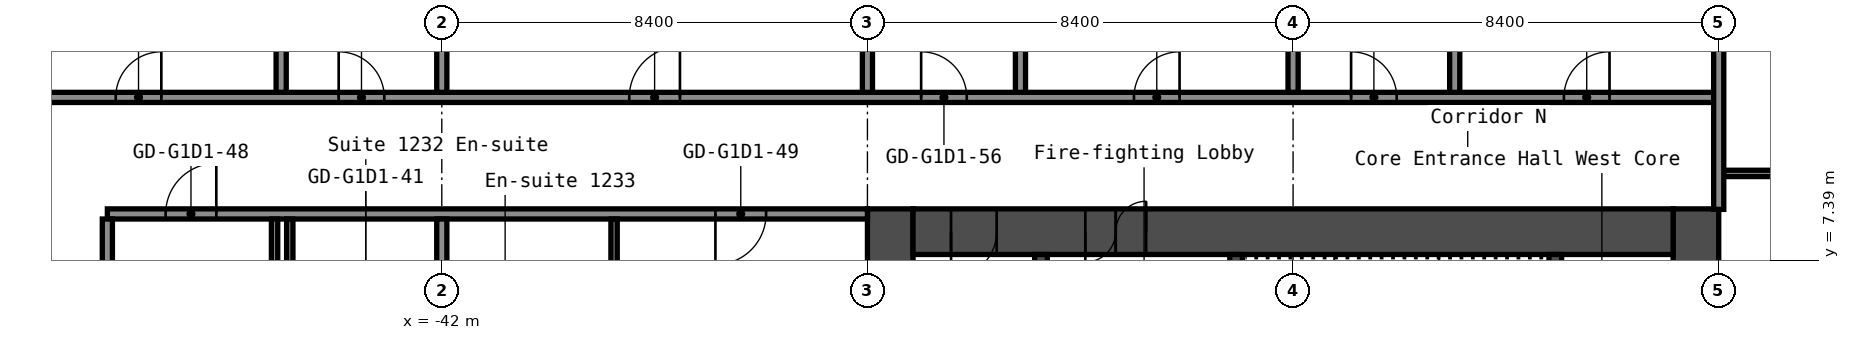
"""IFC4 building model, lengths in metres.
Left out: names, types, materials, properties, quantities, classifications, styles, units other than length and angle.
Written with IfcOpenShell. Run it as: python <this file> out.ifc"""

import sys

from ifc_helpers import new_model, si_unit, direction, frame, frame_2d, origin, place, context, subcontext, project, spatial, rectangle, extrude, element, fill, save


model = new_model("IFC4")
c1 = context("Model", 3, precision=1e-05, world=origin(), true_north=direction((0.0, 1.0)))
c2 = subcontext(c1, "Body", "Model", "MODEL_VIEW")
j1 = project(units=[si_unit("LENGTHUNIT", "METRE"), si_unit("PLANEANGLEUNIT", "RADIAN")], contexts=[c1])
p1 = place(None, origin())
s1 = spatial("IfcSite", under=j1, at=p1, CompositionType="ELEMENT")
p2 = place(p1, origin())
s2 = spatial("IfcBuilding", under=s1, at=p2, CompositionType="ELEMENT")
p3 = place(p2, frame((0.0, 0.0, 45.4)))
s3 = spatial("IfcBuildingStorey", under=s2, at=p3, CompositionType="ELEMENT", Elevation=45.4)
p4 = place(p3, frame((-17.25, -8.4, 0.0), z_axis=(0.0, 0.0, 1.0), x_axis=(0.0, 1.0, 0.0)))
e1 = element("IfcWall", 1, at=p4, inside=s3, PredefinedType="SHEAR", context=c2, shape_type="SweptSolid", body=[
    extrude(rectangle(XDim=16.8, YDim=0.9, at=frame_2d((8.4, 0.0))), origin(), (0.0, 0.0, 1.0), 2.8),
])
p5 = place(p4, frame((12.75, 0.0, 0.0)))
e2 = element("IfcOpeningElement", 2, at=p5, cuts=e1, PredefinedType="OPENING", context=c2, shape_type="SweptSolid", body=[
    extrude(rectangle(XDim=1.2, YDim=2.1, at=frame_2d((0.6, 1.05))), frame((0.0, 0.46, 0.0), z_axis=(0.0, -1.0, 0.0), x_axis=(1.0, 0.0, 0.0)), (0.0, 0.0, 1.0), 0.92),
])
p6 = place(p4, frame((2.85, 0.0, 0.0)))
e3 = element("IfcOpeningElement", 3, at=p6, cuts=e1, PredefinedType="OPENING", context=c2, shape_type="SweptSolid", body=[
    extrude(rectangle(XDim=1.2, YDim=2.1, at=frame_2d((0.6, 1.05))), frame((0.0, 0.46, 0.0), z_axis=(0.0, -1.0, 0.0), x_axis=(1.0, 0.0, 0.0)), (0.0, 0.0, 1.0), 0.92),
])
p7 = place(p3, frame((-33.15, -8.4, 0.0), z_axis=(0.0, 0.0, 1.0), x_axis=(0.0, 1.0, 0.0)))
e4 = element("IfcWall", 4, at=p7, inside=s3, PredefinedType="SHEAR", context=c2, shape_type="SweptSolid", body=[
    extrude(rectangle(XDim=16.8, YDim=0.9, at=frame_2d((8.4, 0.0))), origin(), (0.0, 0.0, 1.0), 2.8),
])
p8 = place(p3, frame((-32.7, 7.95, 0.0), z_axis=(0.0, 0.0, 1.0), x_axis=(1.0, 0.0, 0.0)))
e5 = element("IfcWall", 5, at=p8, inside=s3, PredefinedType="SHEAR", context=c2, shape_type="SweptSolid", body=[
    extrude(rectangle(XDim=15.0, YDim=0.9, at=frame_2d((7.5, 0.0))), origin(), (0.0, 0.0, 1.0), 2.8),
])
p9 = place(p8, frame((3.4, 0.0, 0.0)))
e6 = element("IfcOpeningElement", 6, at=p9, cuts=e5, PredefinedType="OPENING", context=c2, shape_type="SweptSolid", body=[
    extrude(rectangle(XDim=1.2, YDim=2.1, at=frame_2d((0.6, 1.05))), frame((0.0, 0.46, 0.0), z_axis=(0.0, -1.0, 0.0), x_axis=(1.0, 0.0, 0.0)), (0.0, 0.0, 1.0), 0.92),
])
p10 = place(p8, frame((0.75, 0.0, 0.0)))
e7 = element("IfcOpeningElement", 7, at=p10, cuts=e5, PredefinedType="OPENING", context=c2, shape_type="SweptSolid", body=[
    extrude(rectangle(XDim=0.9, YDim=2.1, at=frame_2d((0.45, 1.05))), frame((0.0, 0.46, 0.0), z_axis=(0.0, -1.0, 0.0), x_axis=(1.0, 0.0, 0.0)), (0.0, 0.0, 1.0), 0.92),
])
p11 = place(p3, frame((-20.025, 1.2, 0.0), z_axis=(0.0, 0.0, 1.0), x_axis=(0.0, 1.0, 0.0)))
e8 = element("IfcWall", 8, at=p11, inside=s3, PredefinedType="SHEAR", context=c2, shape_type="SweptSolid", body=[
    extrude(rectangle(XDim=6.3, YDim=0.25, at=frame_2d((3.15, 0.0))), origin(), (0.0, 0.0, 1.0), 2.8),
])
p12 = place(p3, frame((-26.325, 3.75, 0.0), z_axis=(0.0, 0.0, 1.0), x_axis=(0.0, 1.0, 0.0)))
e9 = element("IfcWall", 9, at=p12, inside=s3, PredefinedType="SHEAR", context=c2, shape_type="SweptSolid", body=[
    extrude(rectangle(XDim=3.75, YDim=0.25, at=frame_2d((1.875, 0.0))), origin(), (0.0, 0.0, 1.0), 2.8),
])
p13 = place(p12, frame((1.25, 0.0, 0.0)))
e10 = element("IfcOpeningElement", 10, at=p13, cuts=e9, PredefinedType="OPENING", context=c2, shape_type="SweptSolid", body=[
    extrude(rectangle(XDim=1.2, YDim=2.1, at=frame_2d((0.6, 1.05))), frame((0.0, 0.135, 0.0), z_axis=(0.0, -1.0, 0.0), x_axis=(1.0, 0.0, 0.0)), (0.0, 0.0, 1.0), 0.27),
])
p14 = place(p3, frame((-30.175, 1.45, 0.0), z_axis=(0.0, 0.0, 1.0), x_axis=(0.0, 1.0, 0.0)))
e11 = element("IfcWall", 11, at=p14, inside=s3, PredefinedType="SHEAR", context=c2, shape_type="SweptSolid", body=[
    extrude(rectangle(XDim=6.05, YDim=0.25, at=frame_2d((3.025, 0.0))), origin(), (0.0, 0.0, 1.0), 2.8),
])
p15 = place(p14, frame((2.625, 0.0, 0.0)))
e12 = element("IfcOpeningElement", 12, at=p15, cuts=e11, PredefinedType="OPENING", context=c2, shape_type="SweptSolid", body=[
    extrude(rectangle(XDim=1.1, YDim=2.1, at=frame_2d((0.55, 1.05))), frame((0.0, 0.135, 0.0), z_axis=(0.0, -1.0, 0.0), x_axis=(1.0, 0.0, 0.0)), (0.0, 0.0, 1.0), 0.27),
])
p16 = place(p3, frame((-48.6, 8.3, 0.0), z_axis=(0.0, 0.0, 1.0), x_axis=(1.0, 0.0, 0.0)))
e13 = element("IfcWall", 13, at=p16, inside=s3, PredefinedType="PARTITIONING", context=c2, shape_type="SweptSolid", body=[
    extrude(rectangle(XDim=15.0, YDim=0.2, at=frame_2d((7.5, 0.0))), origin(), (0.0, 0.0, 1.0), 2.8),
])
p17 = place(p16, frame((1.15, 0.0, 0.0)))
e14 = element("IfcOpeningElement", 14, at=p17, cuts=e13, PredefinedType="OPENING", context=c2, shape_type="SweptSolid", body=[
    extrude(rectangle(XDim=1.0, YDim=2.1, at=frame_2d((0.5, 1.05))), frame((0.0, 0.11, 0.0), z_axis=(0.0, -1.0, 0.0), x_axis=(1.0, 0.0, 0.0)), (0.0, 0.0, 1.0), 0.22),
])
p18 = place(p16, frame((12.0, 0.0, 0.0)))
e15 = element("IfcOpeningElement", 15, at=p18, cuts=e13, PredefinedType="OPENING", context=c2, shape_type="SweptSolid", body=[
    extrude(rectangle(XDim=1.0, YDim=2.1, at=frame_2d((0.5, 1.05))), frame((0.0, 0.11, 0.0), z_axis=(0.0, -1.0, 0.0), x_axis=(1.0, 0.0, 0.0)), (0.0, 0.0, 1.0), 0.22),
])
p19 = place(p3, frame((-16.7, 9.1, 0.0), z_axis=(0.0, 0.0, 1.0), x_axis=(1.0, 0.0, 0.0)))
e16 = element("IfcWall", 16, at=p19, inside=s3, PredefinedType="PARTITIONING", context=c2, shape_type="SweptSolid", body=[
    extrude(rectangle(XDim=2.337, YDim=0.125, at=frame_2d((1.169, 0.0))), origin(), (0.0, 0.0, 1.0), 2.8),
])
p20 = place(p3, frame((-51.1, 10.6, 0.0), z_axis=(0.0, 0.0, 1.0), x_axis=(1.0, 0.0, 0.0)))
e17 = element("IfcWall", 17, at=p20, inside=s3, PredefinedType="PARTITIONING", context=c2, shape_type="SweptSolid", body=[
    extrude(rectangle(XDim=34.3, YDim=0.2, at=frame_2d((17.15, 0.0))), origin(), (0.0, 0.0, 1.0), 2.8),
])
p21 = place(p20, frame((2.665, 0.0, 0.0)))
e18 = element("IfcOpeningElement", 18, at=p21, cuts=e17, PredefinedType="OPENING", context=c2, shape_type="SweptSolid", body=[
    extrude(rectangle(XDim=0.9, YDim=2.1, at=frame_2d((0.45, 1.05))), frame((0.0, 0.11, 0.0), z_axis=(0.0, -1.0, 0.0), x_axis=(1.0, 0.0, 0.0)), (0.0, 0.0, 1.0), 0.22),
])
p22 = place(p20, frame((7.065, 0.0, 0.0)))
e19 = element("IfcOpeningElement", 19, at=p22, cuts=e17, PredefinedType="OPENING", context=c2, shape_type="SweptSolid", body=[
    extrude(rectangle(XDim=0.9, YDim=2.1, at=frame_2d((0.45, 1.05))), frame((0.0, 0.11, 0.0), z_axis=(0.0, -1.0, 0.0), x_axis=(1.0, 0.0, 0.0)), (0.0, 0.0, 1.0), 0.22),
])
p23 = place(p20, frame((12.8, 0.0, 0.0)))
e20 = element("IfcOpeningElement", 20, at=p23, cuts=e17, PredefinedType="OPENING", context=c2, shape_type="SweptSolid", body=[
    extrude(rectangle(XDim=1.0, YDim=2.1, at=frame_2d((0.5, 1.05))), frame((0.0, 0.11, 0.0), z_axis=(0.0, -1.0, 0.0), x_axis=(1.0, 0.0, 0.0)), (0.0, 0.0, 1.0), 0.22),
])
p24 = place(p20, frame((18.56, 0.0, 0.0)))
e21 = element("IfcOpeningElement", 21, at=p24, cuts=e17, PredefinedType="OPENING", context=c2, shape_type="SweptSolid", body=[
    extrude(rectangle(XDim=0.9, YDim=2.1, at=frame_2d((0.45, 1.05))), frame((0.0, 0.11, 0.0), z_axis=(0.0, -1.0, 0.0), x_axis=(1.0, 0.0, 0.0)), (0.0, 0.0, 1.0), 0.22),
])
p25 = place(p20, frame((22.76, 0.0, 0.0)))
e22 = element("IfcOpeningElement", 22, at=p25, cuts=e17, PredefinedType="OPENING", context=c2, shape_type="SweptSolid", body=[
    extrude(rectangle(XDim=0.9, YDim=2.1, at=frame_2d((0.45, 1.05))), frame((0.0, 0.11, 0.0), z_axis=(0.0, -1.0, 0.0), x_axis=(1.0, 0.0, 0.0)), (0.0, 0.0, 1.0), 0.22),
])
p26 = place(p20, frame((27.045, 0.0, 0.0)))
e23 = element("IfcOpeningElement", 23, at=p26, cuts=e17, PredefinedType="OPENING", context=c2, shape_type="SweptSolid", body=[
    extrude(rectangle(XDim=0.9, YDim=2.1, at=frame_2d((0.45, 1.05))), frame((0.0, 0.11, 0.0), z_axis=(0.0, -1.0, 0.0), x_axis=(1.0, 0.0, 0.0)), (0.0, 0.0, 1.0), 0.22),
])
p27 = place(p20, frame((31.245, 0.0, 0.0)))
e24 = element("IfcOpeningElement", 24, at=p27, cuts=e17, PredefinedType="OPENING", context=c2, shape_type="SweptSolid", body=[
    extrude(rectangle(XDim=0.9, YDim=2.1, at=frame_2d((0.45, 1.05))), frame((0.0, 0.11, 0.0), z_axis=(0.0, -1.0, 0.0), x_axis=(1.0, 0.0, 0.0)), (0.0, 0.0, 1.0), 0.22),
])
p28 = place(p3, frame((-48.6, -8.2, 0.0), z_axis=(0.0, 0.0, 1.0), x_axis=(0.0, 1.0, 0.0)))
e25 = element("IfcWall", 25, at=p28, inside=s3, PredefinedType="PARTITIONING", context=c2, shape_type="SweptSolid", body=[
    extrude(rectangle(XDim=16.4, YDim=0.2, at=frame_2d((8.2, 0.0))), origin(), (0.0, 0.0, 1.0), 2.8),
])
p29 = place(p3, frame((-45.3, 0.1, 0.0), z_axis=(0.0, 0.0, 1.0), x_axis=(0.0, 1.0, 0.0)))
e26 = element("IfcWall", 26, at=p29, inside=s3, PredefinedType="PARTITIONING", context=c2, shape_type="SweptSolid", body=[
    extrude(rectangle(XDim=8.1, YDim=0.125, at=frame_2d((4.05, 0.0))), origin(), (0.0, 0.0, 1.0), 2.8),
])
p30 = place(p29, frame((3.15, 0.0, 0.0)))
e27 = element("IfcOpeningElement", 27, at=p30, cuts=e26, PredefinedType="OPENING", context=c2, shape_type="SweptSolid", body=[
    extrude(rectangle(XDim=0.9, YDim=2.1, at=frame_2d((0.45, 1.05))), frame((0.0, 0.073, 0.0), z_axis=(0.0, -1.0, 0.0), x_axis=(1.0, 0.0, 0.0)), (0.0, 0.0, 1.0), 0.145),
])
p31 = place(p3, frame((-45.17, 10.7, 0.0), z_axis=(0.0, 0.0, 1.0), x_axis=(0.0, 1.0, 0.0)))
e28 = element("IfcWall", 28, at=p31, inside=s3, PredefinedType="PARTITIONING", context=c2, shape_type="SweptSolid", body=[
    extrude(rectangle(XDim=9.6, YDim=0.2, at=frame_2d((4.8, 0.0))), origin(), (0.0, 0.0, 1.0), 2.8),
])
p32 = place(p3, frame((-45.0, 5.1, 0.0), z_axis=(0.0, 0.0, 1.0), x_axis=(0.0, 1.0, 0.0)))
e29 = element("IfcWall", 29, at=p32, inside=s3, PredefinedType="PARTITIONING", context=c2, shape_type="SweptSolid", body=[
    extrude(rectangle(XDim=3.1, YDim=0.125, at=frame_2d((1.55, 0.0))), origin(), (0.0, 0.0, 1.0), 2.8),
])
p33 = place(p3, frame((-42.0, 0.0, 0.0), z_axis=(0.0, 0.0, 1.0), x_axis=(0.0, 1.0, 0.0)))
e30 = element("IfcWall", 30, at=p33, inside=s3, PredefinedType="PARTITIONING", context=c2, shape_type="SweptSolid", body=[
    extrude(rectangle(XDim=8.2, YDim=0.2, at=frame_2d((4.1, 0.0))), origin(), (0.0, 0.0, 1.0), 2.8),
])
p34 = place(p3, frame((-42.0, 10.7, 0.0), z_axis=(0.0, 0.0, 1.0), x_axis=(0.0, 1.0, 0.0)))
e31 = element("IfcWall", 31, at=p34, inside=s3, PredefinedType="PARTITIONING", context=c2, shape_type="SweptSolid", body=[
    extrude(rectangle(XDim=9.6, YDim=0.2, at=frame_2d((4.8, 0.0))), origin(), (0.0, 0.0, 1.0), 2.8),
])
p35 = place(p3, frame((-38.6, 4.9, 0.0), z_axis=(0.0, 0.0, 1.0), x_axis=(0.0, 1.0, 0.0)))
e32 = element("IfcWall", 32, at=p35, inside=s3, PredefinedType="PARTITIONING", context=c2, shape_type="SweptSolid", body=[
    extrude(rectangle(XDim=3.3, YDim=0.125, at=frame_2d((1.65, 0.0))), origin(), (0.0, 0.0, 1.0), 2.8),
])
for number, where, z_axis, x_axis in (
    (33, (-33.6, 10.7, 0.0), (0.0, 0.0, 1.0), (0.0, 1.0, 0.0)),
    (34, (-30.58, 10.7, 0.0), (0.0, 0.0, 1.0), (0.0, 1.0, 0.0)),
    (35, (-25.2, 10.7, 0.0), (0.0, 0.0, 1.0), (0.0, 1.0, 0.0)),
    (36, (-22.01, 10.7, 0.0), (0.0, 0.0, 1.0), (0.0, 1.0, 0.0)),
):
    element("IfcWall", number, at=place(p3, frame(where, z_axis=z_axis, x_axis=x_axis)), inside=s3, PredefinedType="PARTITIONING", context=c2, shape_type="SweptSolid", body=[
        extrude(rectangle(XDim=9.6, YDim=0.2, at=frame_2d((4.8, 0.0))), origin(), (0.0, 0.0, 1.0), 2.8),
    ])
p36 = place(p3, frame((-16.8, 8.39, 0.0), z_axis=(0.0, 0.0, 1.0), x_axis=(0.0, 1.0, 0.0)))
e37 = element("IfcWall", 37, at=p36, inside=s3, PredefinedType="PARTITIONING", context=c2, shape_type="SweptSolid", body=[
    extrude(rectangle(XDim=11.91, YDim=0.2, at=frame_2d((5.955, 0.0))), origin(), (0.0, 0.0, 1.0), 2.8),
])
p37 = place(p9, origin())
e38 = element("IfcDoor", 38, at=p37, inside=s3, OperationType="DOUBLE_DOOR_SINGLE_SWING", PredefinedType="DOOR", context=c2, shape_type="SweptSolid", body=[
    extrude(rectangle(XDim=1.2, YDim=2.1, at=frame_2d((0.6, 1.05))), frame((0.0, 0.025, 0.0), z_axis=(0.0, -1.0, 0.0), x_axis=(1.0, 0.0, 0.0)), (0.0, 0.0, 1.0), 0.05),
])
fill(e6, e38)
p38 = place(p10, origin())
e39 = element("IfcDoor", 39, at=p38, inside=s3, OperationType="SINGLE_SWING_LEFT", PredefinedType="DOOR", context=c2, shape_type="SweptSolid", body=[
    extrude(rectangle(XDim=0.9, YDim=2.1, at=frame_2d((0.45, 1.05))), frame((0.0, 0.025, 0.0), z_axis=(0.0, -1.0, 0.0), x_axis=(1.0, 0.0, 0.0)), (0.0, 0.0, 1.0), 0.05),
])
fill(e7, e39)
p39 = place(p17, origin())
e40 = element("IfcDoor", 40, at=p39, inside=s3, OperationType="SINGLE_SWING_LEFT", PredefinedType="DOOR", context=c2, shape_type="SweptSolid", body=[
    extrude(rectangle(XDim=1.0, YDim=2.1, at=frame_2d((0.5, 1.05))), frame((0.0, 0.025, 0.0), z_axis=(0.0, -1.0, 0.0), x_axis=(1.0, 0.0, 0.0)), (0.0, 0.0, 1.0), 0.05),
])
fill(e14, e40)
p40 = place(p18, origin())
e41 = element("IfcDoor", 41, at=p40, inside=s3, OperationType="SINGLE_SWING_LEFT", PredefinedType="DOOR", context=c2, shape_type="SweptSolid", body=[
    extrude(rectangle(XDim=1.0, YDim=2.1, at=frame_2d((0.5, 1.05))), frame((0.0, 0.025, 0.0), z_axis=(0.0, -1.0, 0.0), x_axis=(1.0, 0.0, 0.0)), (0.0, 0.0, 1.0), 0.05),
])
fill(e15, e41)
p41 = place(p21, origin())
e42 = element("IfcDoor", 42, at=p41, inside=s3, OperationType="SINGLE_SWING_LEFT", PredefinedType="DOOR", context=c2, shape_type="SweptSolid", body=[
    extrude(rectangle(XDim=0.9, YDim=2.1, at=frame_2d((0.45, 1.05))), frame((0.0, 0.025, 0.0), z_axis=(0.0, -1.0, 0.0), x_axis=(1.0, 0.0, 0.0)), (0.0, 0.0, 1.0), 0.05),
])
fill(e18, e42)
p42 = place(p22, origin())
e43 = element("IfcDoor", 43, at=p42, inside=s3, OperationType="SINGLE_SWING_RIGHT", PredefinedType="DOOR", context=c2, shape_type="SweptSolid", body=[
    extrude(rectangle(XDim=0.9, YDim=2.1, at=frame_2d((0.45, 1.05))), frame((0.0, 0.025, 0.0), z_axis=(0.0, -1.0, 0.0), x_axis=(1.0, 0.0, 0.0)), (0.0, 0.0, 1.0), 0.05),
])
fill(e19, e43)
p43 = place(p23, origin())
e44 = element("IfcDoor", 44, at=p43, inside=s3, OperationType="SINGLE_SWING_LEFT", PredefinedType="DOOR", context=c2, shape_type="SweptSolid", body=[
    extrude(rectangle(XDim=1.0, YDim=2.1, at=frame_2d((0.5, 1.05))), frame((0.0, 0.025, 0.0), z_axis=(0.0, -1.0, 0.0), x_axis=(1.0, 0.0, 0.0)), (0.0, 0.0, 1.0), 0.05),
])
fill(e20, e44)
p44 = place(p24, origin())
e45 = element("IfcDoor", 45, at=p44, inside=s3, OperationType="SINGLE_SWING_RIGHT", PredefinedType="DOOR", context=c2, shape_type="SweptSolid", body=[
    extrude(rectangle(XDim=0.9, YDim=2.1, at=frame_2d((0.45, 1.05))), frame((0.0, 0.025, 0.0), z_axis=(0.0, -1.0, 0.0), x_axis=(1.0, 0.0, 0.0)), (0.0, 0.0, 1.0), 0.05),
])
fill(e21, e45)
p45 = place(p25, origin())
e46 = element("IfcDoor", 46, at=p45, inside=s3, OperationType="SINGLE_SWING_LEFT", PredefinedType="DOOR", context=c2, shape_type="SweptSolid", body=[
    extrude(rectangle(XDim=0.9, YDim=2.1, at=frame_2d((0.45, 1.05))), frame((0.0, 0.025, 0.0), z_axis=(0.0, -1.0, 0.0), x_axis=(1.0, 0.0, 0.0)), (0.0, 0.0, 1.0), 0.05),
])
fill(e22, e46)
p46 = place(p26, origin())
e47 = element("IfcDoor", 47, at=p46, inside=s3, OperationType="SINGLE_SWING_RIGHT", PredefinedType="DOOR", context=c2, shape_type="SweptSolid", body=[
    extrude(rectangle(XDim=0.9, YDim=2.1, at=frame_2d((0.45, 1.05))), frame((0.0, 0.025, 0.0), z_axis=(0.0, -1.0, 0.0), x_axis=(1.0, 0.0, 0.0)), (0.0, 0.0, 1.0), 0.05),
])
fill(e23, e47)
p47 = place(p27, origin())
e48 = element("IfcDoor", 48, at=p47, inside=s3, OperationType="SINGLE_SWING_LEFT", PredefinedType="DOOR", context=c2, shape_type="SweptSolid", body=[
    extrude(rectangle(XDim=0.9, YDim=2.1, at=frame_2d((0.45, 1.05))), frame((0.0, 0.025, 0.0), z_axis=(0.0, -1.0, 0.0), x_axis=(1.0, 0.0, 0.0)), (0.0, 0.0, 1.0), 0.05),
])
fill(e24, e48)
save(model, sys.argv[1])
